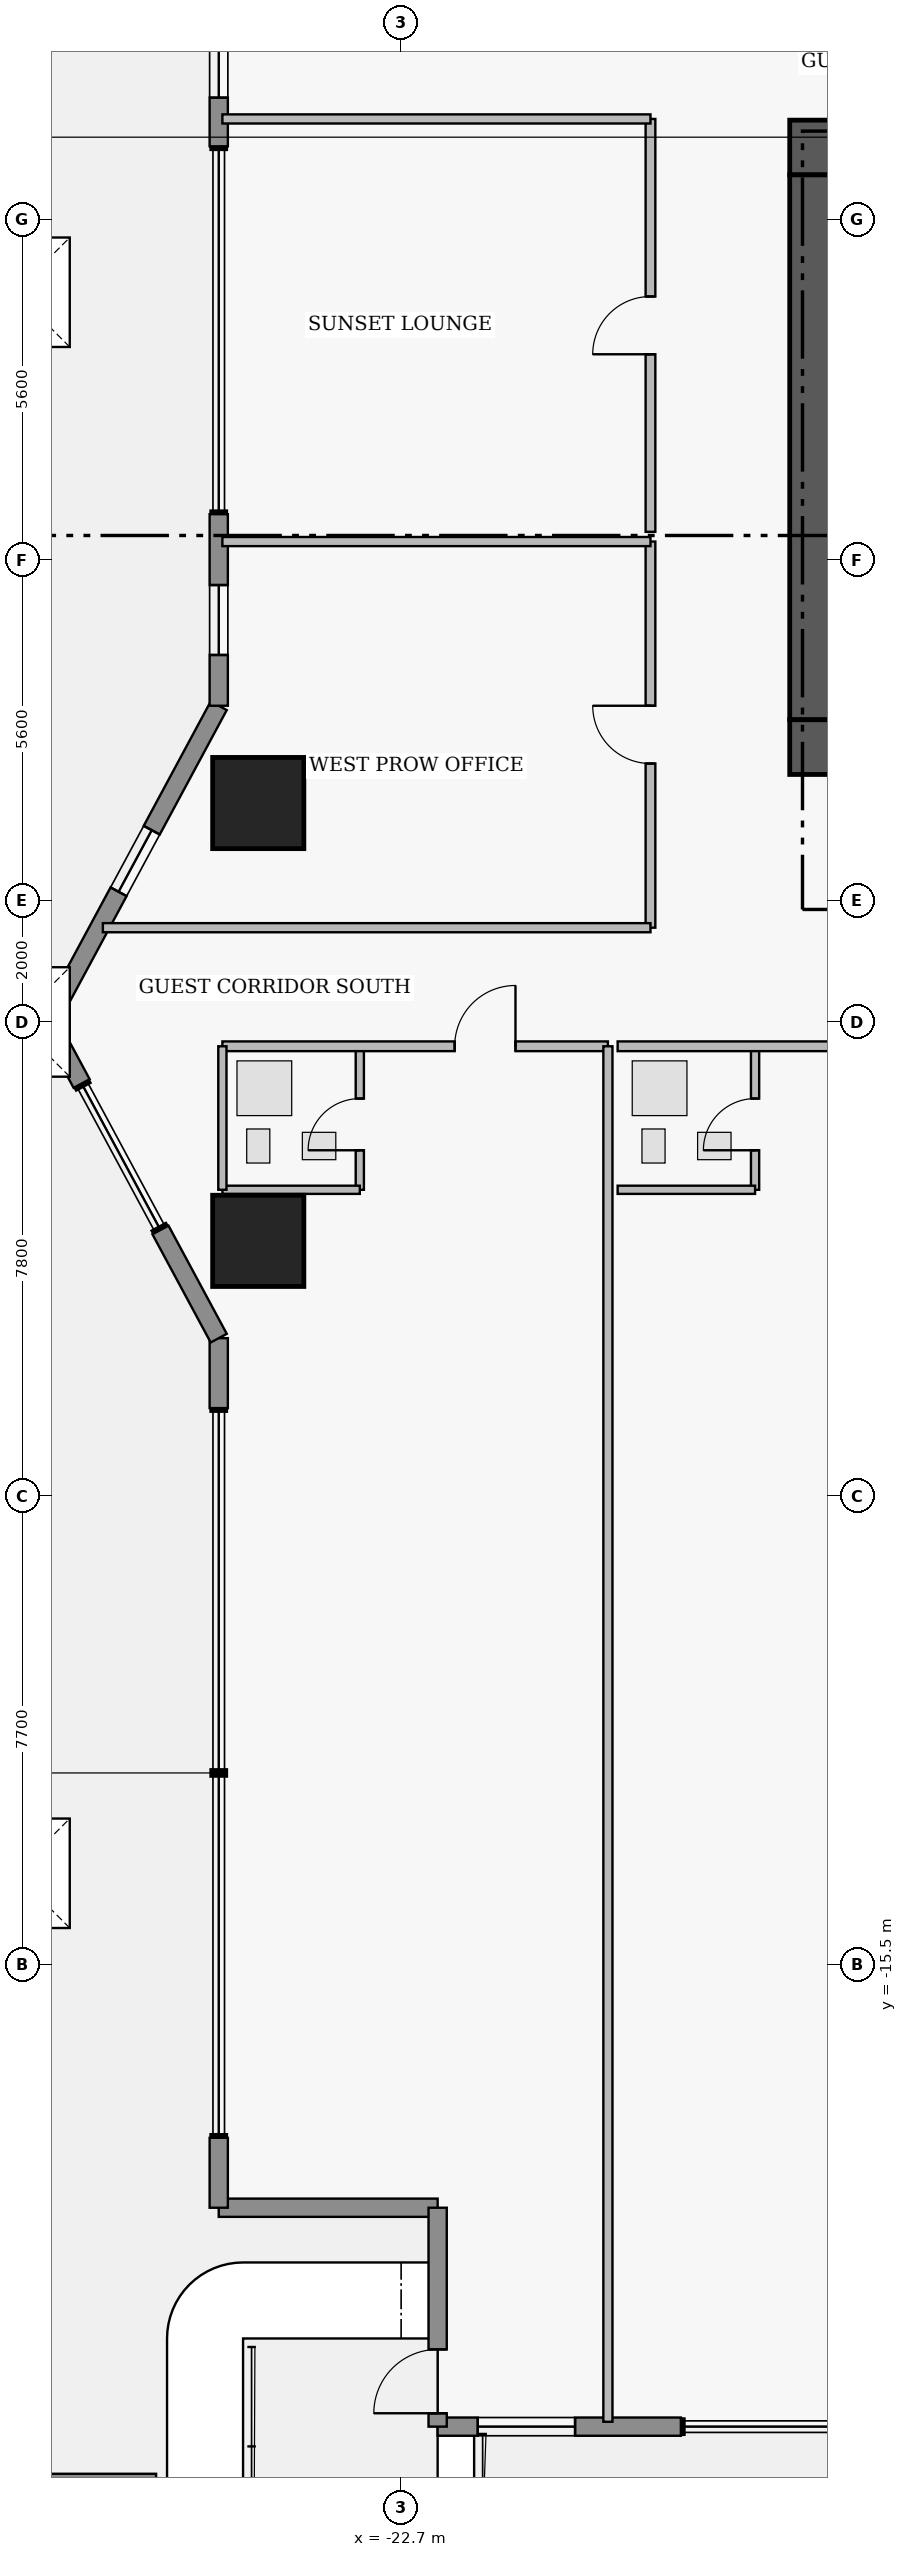
"""IFC4 building model, lengths in metres.
Left out: names, types, materials, properties, quantities, classifications, styles, units other than length and angle.
Written with IfcOpenShell. Run it as: python <this file> out.ifc"""

import sys

from ifc_helpers import new_model, si_unit, direction, frame, frame_2d, origin, origin_2d, place, context, subcontext, project, spatial, rectangle, extrude, element, fill, save


model = new_model("IFC4")
c1 = context("Model", 3, precision=1e-05, world=origin(), true_north=direction((0.0, 1.0)))
c2 = subcontext(c1, "Body", "Model", "MODEL_VIEW")
j1 = project(units=[si_unit("LENGTHUNIT", "METRE"), si_unit("PLANEANGLEUNIT", "RADIAN")], contexts=[c1])
p1 = place(None, origin())
s1 = spatial("IfcSite", under=j1, at=p1, CompositionType="ELEMENT")
p2 = place(p1, origin())
s2 = spatial("IfcBuilding", under=s1, at=p2, CompositionType="ELEMENT")
p3 = place(p2, frame((0.0, 0.0, 27.6)))
s3 = spatial("IfcBuildingStorey", under=s2, at=p3, CompositionType="ELEMENT", Elevation=27.6)
p4 = place(p3, frame((-16.31, 14.38, 0.0), z_axis=(0.0, 0.0, 1.0), x_axis=(1.0, 0.0, 0.0)))
e1 = element("IfcWall", 1, at=p4, inside=s3, PredefinedType="SHEAR", context=c2, shape_type="SweptSolid", body=[
    extrude(rectangle(XDim=4.71, YDim=0.9, at=frame_2d((2.355, 0.0))), origin(), (0.0, 0.0, 1.0), 3.46),
])
p5 = place(p3, frame((-15.86, 4.97, 0.0), z_axis=(0.0, 0.0, 1.0), x_axis=(0.0, 1.0, 0.0)))
e2 = element("IfcWall", 2, at=p5, inside=s3, PredefinedType="SHEAR", context=c2, shape_type="SweptSolid", body=[
    extrude(rectangle(XDim=8.96, YDim=0.9, at=frame_2d((4.48, 0.0))), origin(), (0.0, 0.0, 1.0), 3.46),
])
p6 = place(p3, frame((-16.31, 4.52, 0.0), z_axis=(0.0, 0.0, 1.0), x_axis=(1.0, 0.0, 0.0)))
e3 = element("IfcWall", 3, at=p6, inside=s3, PredefinedType="SHEAR", context=c2, shape_type="SweptSolid", body=[
    extrude(rectangle(XDim=4.71, YDim=0.9, at=frame_2d((2.355, 0.0))), origin(), (0.0, 0.0, 1.0), 3.46),
])
for number, where, z_axis, x_axis in (
    (4, (-25.05, -3.6, 0.0), (0.0, 0.0, 1.0), (1.0, 0.0, 0.0)),
    (5, (-25.05, 3.6, 0.0), (0.0, 0.0, 1.0), (1.0, 0.0, 0.0)),
):
    element("IfcColumn", number, at=place(p3, frame(where, z_axis=z_axis, x_axis=x_axis)), inside=s3, PredefinedType="COLUMN", context=c2, shape_type="SweptSolid", body=[
        extrude(rectangle(XDim=1.5, YDim=1.5, at=origin_2d()), origin(), (0.0, 0.0, 1.0), 3.65),
    ])
p7 = place(p3, frame((-26.73, -24.0, 0.0), z_axis=(0.0, 0.0, 1.0), x_axis=(-1.0, 0.0, 0.0)))
e6 = element("IfcWall", 6, at=p7, inside=s3, PredefinedType="PARAPET", context=c2, shape_type="SweptSolid", body=[
    extrude(rectangle(XDim=5.09, YDim=0.25, at=frame_2d((2.545, 0.0))), origin(), (0.0, 0.0, 1.0), 1.15),
])
p8 = place(p3, frame((-22.1, -19.5, 0.0), z_axis=(0.0, 0.0, 1.0), x_axis=(-1.0, 0.0, 0.0)))
e7 = element("IfcWall", 7, at=p8, inside=s3, PredefinedType="STANDARD", context=c2, shape_type="SweptSolid", body=[
    extrude(rectangle(XDim=3.6, YDim=0.3, at=frame_2d((1.8, 0.0))), origin(), (0.0, 0.0, 1.0), 3.43),
])
p9 = place(p3, frame((-25.7, -19.5, 0.0), z_axis=(0.0, 0.0, 1.0), x_axis=(0.0, 1.0, 0.0)))
e8 = element("IfcWall", 8, at=p9, inside=s3, PredefinedType="STANDARD", context=c2, shape_type="SweptSolid", body=[
    extrude(rectangle(XDim=1.15, YDim=0.3, at=frame_2d((0.575, 0.0))), origin(), (0.0, 0.0, 1.0), 3.43),
])
p10 = place(p3, frame((-25.7, -6.35, 0.0), z_axis=(0.0, 0.0, 1.0), x_axis=(0.0, 1.0, 0.0)))
e9 = element("IfcWall", 9, at=p10, inside=s3, PredefinedType="STANDARD", context=c2, shape_type="SweptSolid", body=[
    extrude(rectangle(XDim=1.15, YDim=0.3, at=frame_2d((0.575, 0.0))), origin(), (0.0, 0.0, 1.0), 3.43),
])
p11 = place(p3, frame((-25.7, -5.2, 0.0), z_axis=(0.0, 0.0, 1.0), x_axis=(-0.474121438562, 0.88045946045, 0.0)))
e10 = element("IfcWall", 10, at=p11, inside=s3, PredefinedType="STANDARD", context=c2, shape_type="SweptSolid", body=[
    extrude(rectangle(XDim=2.021, YDim=0.3, at=frame_2d((1.01, 0.0))), origin(), (0.0, 0.0, 1.0), 3.43),
])
p12 = place(p3, frame((-27.955, -1.012, 0.0), z_axis=(0.0, 0.0, 1.0), x_axis=(-0.474099823035, 0.880471099922, 0.0)))
e11 = element("IfcWall", 11, at=p12, inside=s3, PredefinedType="STANDARD", context=c2, shape_type="SweptSolid", body=[
    extrude(rectangle(XDim=1.15, YDim=0.3, at=frame_2d((0.575, 0.0))), origin(), (0.0, 0.0, 1.0), 3.43),
])
p13 = place(p3, frame((-28.5, 0.0, 0.0), z_axis=(0.0, 0.0, 1.0), x_axis=(0.474109683532, 0.880465790352, 0.0)))
e12 = element("IfcWall", 12, at=p13, inside=s3, PredefinedType="STANDARD", context=c2, shape_type="SweptSolid", body=[
    extrude(rectangle(XDim=5.906, YDim=0.3, at=frame_2d((2.953, 0.0))), origin(), (0.0, 0.0, 1.0), 3.43),
])
p14 = place(p13, frame((2.432, 0.0, 0.95)))
e13 = element("IfcOpeningElement", 13, at=p14, cuts=e12, PredefinedType="OPENING", context=c2, shape_type="SweptSolid", body=[
    extrude(rectangle(XDim=1.15, YDim=1.55, at=frame_2d((0.575, 0.775))), frame((0.0, 0.16, 0.0), z_axis=(0.0, -1.0, 0.0), x_axis=(1.0, 0.0, 0.0)), (0.0, 0.0, 1.0), 0.32),
])
p15 = place(p3, frame((-25.7, 5.2, 0.0), z_axis=(0.0, 0.0, 1.0), x_axis=(0.0, 1.0, 0.0)))
e14 = element("IfcWall", 14, at=p15, inside=s3, PredefinedType="STANDARD", context=c2, shape_type="SweptSolid", body=[
    extrude(rectangle(XDim=3.15, YDim=0.3, at=frame_2d((1.575, 0.0))), origin(), (0.0, 0.0, 1.0), 3.43),
])
p16 = place(p15, frame((0.835, 0.0, 0.95)))
e15 = element("IfcOpeningElement", 15, at=p16, cuts=e14, PredefinedType="OPENING", context=c2, shape_type="SweptSolid", body=[
    extrude(rectangle(XDim=1.15, YDim=1.55, at=frame_2d((0.575, 0.775))), frame((0.0, 0.16, 0.0), z_axis=(0.0, -1.0, 0.0), x_axis=(1.0, 0.0, 0.0)), (0.0, 0.0, 1.0), 0.32),
])
p17 = place(p3, frame((-25.7, 14.4, 0.0), z_axis=(0.0, 0.0, 1.0), x_axis=(0.0, 1.0, 0.0)))
e16 = element("IfcWall", 16, at=p17, inside=s3, PredefinedType="STANDARD", context=c2, shape_type="SweptSolid", body=[
    extrude(rectangle(XDim=5.1, YDim=0.3, at=frame_2d((2.55, 0.0))), origin(), (0.0, 0.0, 1.0), 3.43),
])
p18 = place(p17, frame((0.8, 0.0, 0.95)))
e17 = element("IfcOpeningElement", 17, at=p18, cuts=e16, PredefinedType="OPENING", context=c2, shape_type="SweptSolid", body=[
    extrude(rectangle(XDim=1.15, YDim=1.55, at=frame_2d((0.575, 0.775))), frame((0.0, 0.16, 0.0), z_axis=(0.0, -1.0, 0.0), x_axis=(1.0, 0.0, 0.0)), (0.0, 0.0, 1.0), 0.32),
])
p19 = place(p17, frame((2.84, 0.0, 0.85)))
e18 = element("IfcOpeningElement", 18, at=p19, cuts=e16, PredefinedType="OPENING", context=c2, shape_type="SweptSolid", body=[
    extrude(rectangle(XDim=1.6, YDim=1.8, at=frame_2d((0.8, 0.9))), frame((0.0, 0.16, 0.0), z_axis=(0.0, -1.0, 0.0), x_axis=(1.0, 0.0, 0.0)), (0.0, 0.0, 1.0), 0.32),
])
p20 = place(p3, frame((-18.1, -23.1, 0.0), z_axis=(0.0, 0.0, 1.0), x_axis=(-1.0, 0.0, 0.0)))
e19 = element("IfcWall", 19, at=p20, inside=s3, PredefinedType="STANDARD", context=c2, shape_type="SweptSolid", body=[
    extrude(rectangle(XDim=4.0, YDim=0.3, at=frame_2d((2.0, 0.0))), origin(), (0.0, 0.0, 1.0), 3.43),
])
p21 = place(p20, frame((1.74, 0.0, 0.85)))
e20 = element("IfcOpeningElement", 20, at=p21, cuts=e19, PredefinedType="OPENING", context=c2, shape_type="SweptSolid", body=[
    extrude(rectangle(XDim=1.6, YDim=1.8, at=frame_2d((0.8, 0.9))), frame((0.0, 0.16, 0.0), z_axis=(0.0, -1.0, 0.0), x_axis=(1.0, 0.0, 0.0)), (0.0, 0.0, 1.0), 0.32),
])
p22 = place(p3, frame((-22.1, -23.1, 0.0), z_axis=(0.0, 0.0, 1.0), x_axis=(0.0, 1.0, 0.0)))
e21 = element("IfcWall", 21, at=p22, inside=s3, PredefinedType="STANDARD", context=c2, shape_type="SweptSolid", body=[
    extrude(rectangle(XDim=3.6, YDim=0.3, at=frame_2d((1.8, 0.0))), origin(), (0.0, 0.0, 1.0), 3.43),
])
p23 = place(p22, frame((0.22, 0.0, 0.0)))
e22 = element("IfcOpeningElement", 22, at=p23, cuts=e21, PredefinedType="OPENING", context=c2, shape_type="SweptSolid", body=[
    extrude(rectangle(XDim=1.05, YDim=2.2, at=frame_2d((0.525, 1.1))), frame((0.0, 0.16, 0.0), z_axis=(0.0, -1.0, 0.0), x_axis=(1.0, 0.0, 0.0)), (0.0, 0.0, 1.0), 0.32),
])
p24 = place(p3, frame((-23.38, -2.76, 0.0), z_axis=(0.0, 0.0, 1.0), x_axis=(0.0, 1.0, 0.0)))
e23 = element("IfcWall", 23, at=p24, inside=s3, PredefinedType="PLUMBINGWALL", context=c2, shape_type="SweptSolid", body=[
    extrude(rectangle(XDim=2.36, YDim=0.135, at=frame_2d((1.18, 0.0))), origin(), (0.0, 0.0, 1.0), 3.43),
])
p25 = place(p24, frame((0.65, 0.0, 0.0)))
e24 = element("IfcOpeningElement", 24, at=p25, cuts=e23, PredefinedType="OPENING", context=c2, shape_type="SweptSolid", body=[
    extrude(rectangle(XDim=0.85, YDim=2.1, at=frame_2d((0.425, 1.05))), frame((0.0, 0.077, 0.0), z_axis=(0.0, -1.0, 0.0), x_axis=(1.0, 0.0, 0.0)), (0.0, 0.0, 1.0), 0.155),
])
p26 = place(p3, frame((-25.64, -0.4, 0.0), z_axis=(0.0, 0.0, 1.0), x_axis=(1.0, 0.0, 0.0)))
e25 = element("IfcWall", 25, at=p26, inside=s3, PredefinedType="PARTITIONING", context=c2, shape_type="SweptSolid", body=[
    extrude(rectangle(XDim=6.34, YDim=0.16, at=frame_2d((3.17, 0.0))), origin(), (0.0, 0.0, 1.0), 3.43),
])
p27 = place(p26, frame((3.82, 0.0, 0.0)))
e26 = element("IfcOpeningElement", 26, at=p27, cuts=e25, PredefinedType="OPENING", context=c2, shape_type="SweptSolid", body=[
    extrude(rectangle(XDim=1.0, YDim=2.15, at=frame_2d((0.5, 1.075))), frame((0.0, 0.09, 0.0), z_axis=(0.0, -1.0, 0.0), x_axis=(1.0, 0.0, 0.0)), (0.0, 0.0, 1.0), 0.18),
])
p28 = place(p3, frame((-16.88, -2.76, 0.0), z_axis=(0.0, 0.0, 1.0), x_axis=(0.0, 1.0, 0.0)))
e27 = element("IfcWall", 27, at=p28, inside=s3, PredefinedType="PLUMBINGWALL", context=c2, shape_type="SweptSolid", body=[
    extrude(rectangle(XDim=2.36, YDim=0.135, at=frame_2d((1.18, 0.0))), origin(), (0.0, 0.0, 1.0), 3.43),
])
p29 = place(p28, frame((0.65, 0.0, 0.0)))
e28 = element("IfcOpeningElement", 28, at=p29, cuts=e27, PredefinedType="OPENING", context=c2, shape_type="SweptSolid", body=[
    extrude(rectangle(XDim=0.85, YDim=2.1, at=frame_2d((0.425, 1.05))), frame((0.0, 0.077, 0.0), z_axis=(0.0, -1.0, 0.0), x_axis=(1.0, 0.0, 0.0)), (0.0, 0.0, 1.0), 0.155),
])
p30 = place(p3, frame((-19.14, -0.4, 0.0), z_axis=(0.0, 0.0, 1.0), x_axis=(1.0, 0.0, 0.0)))
e29 = element("IfcWall", 29, at=p30, inside=s3, PredefinedType="PARTITIONING", context=c2, shape_type="SweptSolid", body=[
    extrude(rectangle(XDim=6.34, YDim=0.16, at=frame_2d((3.17, 0.0))), origin(), (0.0, 0.0, 1.0), 3.43),
])
p31 = place(p30, frame((3.82, 0.0, 0.0)))
e30 = element("IfcOpeningElement", 30, at=p31, cuts=e29, PredefinedType="OPENING", context=c2, shape_type="SweptSolid", body=[
    extrude(rectangle(XDim=1.0, YDim=2.15, at=frame_2d((0.5, 1.075))), frame((0.0, 0.09, 0.0), z_axis=(0.0, -1.0, 0.0), x_axis=(1.0, 0.0, 0.0)), (0.0, 0.0, 1.0), 0.18),
])
p32 = place(p3, frame((-18.6, 1.55, 0.0), z_axis=(0.0, 0.0, 1.0), x_axis=(0.0, 1.0, 0.0)))
e31 = element("IfcWall", 31, at=p32, inside=s3, PredefinedType="PARTITIONING", context=c2, shape_type="SweptSolid", body=[
    extrude(rectangle(XDim=6.35, YDim=0.16, at=frame_2d((3.175, 0.0))), origin(), (0.0, 0.0, 1.0), 3.43),
])
p33 = place(p32, frame((2.7, 0.0, 0.0)))
e32 = element("IfcOpeningElement", 32, at=p33, cuts=e31, PredefinedType="OPENING", context=c2, shape_type="SweptSolid", body=[
    extrude(rectangle(XDim=0.95, YDim=2.15, at=frame_2d((0.475, 1.075))), frame((0.0, 0.09, 0.0), z_axis=(0.0, -1.0, 0.0), x_axis=(1.0, 0.0, 0.0)), (0.0, 0.0, 1.0), 0.18),
])
p34 = place(p3, frame((-18.6, 8.06, 0.0), z_axis=(0.0, 0.0, 1.0), x_axis=(0.0, 1.0, 0.0)))
e33 = element("IfcWall", 33, at=p34, inside=s3, PredefinedType="PARTITIONING", context=c2, shape_type="SweptSolid", body=[
    extrude(rectangle(XDim=6.79, YDim=0.16, at=frame_2d((3.395, 0.0))), origin(), (0.0, 0.0, 1.0), 3.43),
])
p35 = place(p34, frame((2.92, 0.0, 0.0)))
e34 = element("IfcOpeningElement", 34, at=p35, cuts=e33, PredefinedType="OPENING", context=c2, shape_type="SweptSolid", body=[
    extrude(rectangle(XDim=0.95, YDim=2.15, at=frame_2d((0.475, 1.075))), frame((0.0, 0.09, 0.0), z_axis=(0.0, -1.0, 0.0), x_axis=(1.0, 0.0, 0.0)), (0.0, 0.0, 1.0), 0.18),
])
p36 = place(p3, frame((-25.64, -2.76, 0.0), z_axis=(0.0, 0.0, 1.0), x_axis=(1.0, 0.0, 0.0)))
e35 = element("IfcWall", 35, at=p36, inside=s3, PredefinedType="PLUMBINGWALL", context=c2, shape_type="SweptSolid", body=[
    extrude(rectangle(XDim=2.26, YDim=0.135, at=frame_2d((1.13, 0.0))), origin(), (0.0, 0.0, 1.0), 3.43),
])
p37 = place(p3, frame((-25.64, -2.76, 0.0), z_axis=(0.0, 0.0, 1.0), x_axis=(0.0, 1.0, 0.0)))
e36 = element("IfcWall", 36, at=p37, inside=s3, PredefinedType="PLUMBINGWALL", context=c2, shape_type="SweptSolid", body=[
    extrude(rectangle(XDim=2.36, YDim=0.135, at=frame_2d((1.18, 0.0))), origin(), (0.0, 0.0, 1.0), 3.43),
])
p38 = place(p3, frame((-19.3, -23.02, 0.0), z_axis=(0.0, 0.0, 1.0), x_axis=(0.0, 1.0, 0.0)))
e37 = element("IfcWall", 37, at=p38, inside=s3, PredefinedType="PARTITIONING", context=c2, shape_type="SweptSolid", body=[
    extrude(rectangle(XDim=22.62, YDim=0.15, at=frame_2d((11.31, 0.0))), origin(), (0.0, 0.0, 1.0), 3.43),
])
p39 = place(p3, frame((-19.14, -2.76, 0.0), z_axis=(0.0, 0.0, 1.0), x_axis=(1.0, 0.0, 0.0)))
e38 = element("IfcWall", 38, at=p39, inside=s3, PredefinedType="PLUMBINGWALL", context=c2, shape_type="SweptSolid", body=[
    extrude(rectangle(XDim=2.26, YDim=0.135, at=frame_2d((1.13, 0.0))), origin(), (0.0, 0.0, 1.0), 3.43),
])
p40 = place(p3, frame((-27.605, 1.55, 0.0), z_axis=(0.0, 0.0, 1.0), x_axis=(1.0, 0.0, 0.0)))
e39 = element("IfcWall", 39, at=p40, inside=s3, PredefinedType="PARTITIONING", context=c2, shape_type="SweptSolid", body=[
    extrude(rectangle(XDim=9.005, YDim=0.15, at=frame_2d((4.503, 0.0))), origin(), (0.0, 0.0, 1.0), 3.43),
])
for number, where, z_axis, x_axis in (
    (40, (-25.64, 7.9, 0.0), (0.0, 0.0, 1.0), (1.0, 0.0, 0.0)),
    (41, (-25.64, 14.85, 0.0), (0.0, 0.0, 1.0), (1.0, 0.0, 0.0)),
):
    element("IfcWall", number, at=place(p3, frame(where, z_axis=z_axis, x_axis=x_axis)), inside=s3, PredefinedType="PARTITIONING", context=c2, shape_type="SweptSolid", body=[
        extrude(rectangle(XDim=7.04, YDim=0.15, at=frame_2d((3.52, 0.0))), origin(), (0.0, 0.0, 1.0), 3.43),
    ])
p41 = place(p3, frame((0.0, 0.0, -0.22)))
p42 = place(p41, frame((-29.05, -14.0, 0.0)))
p43 = place(p42, frame((0.0, 0.0, 0.17)))
e42 = element("IfcWindow", 42, at=p43, inside=s3, PartitioningType="SINGLE_PANEL", PredefinedType="SKYLIGHT", context=c2, shape_type="SweptSolid", body=[
    extrude(rectangle(XDim=1.8, YDim=1.8, at=origin_2d()), origin(), (0.0, 0.0, 1.0), 0.05),
])
p44 = place(p41, frame((-29.05, 0.0, 0.0)))
p45 = place(p44, frame((0.0, 0.0, 0.17)))
e43 = element("IfcWindow", 43, at=p45, inside=s3, PartitioningType="SINGLE_PANEL", PredefinedType="SKYLIGHT", context=c2, shape_type="SweptSolid", body=[
    extrude(rectangle(XDim=1.8, YDim=1.8, at=origin_2d()), origin(), (0.0, 0.0, 1.0), 0.05),
])
p46 = place(p41, frame((-29.05, 12.0, 0.0)))
p47 = place(p46, frame((0.0, 0.0, 0.17)))
e44 = element("IfcWindow", 44, at=p47, inside=s3, PartitioningType="SINGLE_PANEL", PredefinedType="SKYLIGHT", context=c2, shape_type="SweptSolid", body=[
    extrude(rectangle(XDim=1.8, YDim=1.8, at=origin_2d()), origin(), (0.0, 0.0, 1.0), 0.05),
])
p48 = place(p14, origin())
e45 = element("IfcWindow", 45, at=p48, inside=s3, PartitioningType="SINGLE_PANEL", PredefinedType="WINDOW", context=c2, shape_type="SweptSolid", body=[
    extrude(rectangle(XDim=1.15, YDim=1.55, at=frame_2d((0.575, 0.775))), frame((0.0, 0.03, 0.0), z_axis=(0.0, -1.0, 0.0), x_axis=(1.0, 0.0, 0.0)), (0.0, 0.0, 1.0), 0.06),
])
fill(e13, e45)
p49 = place(p16, origin())
e46 = element("IfcWindow", 46, at=p49, inside=s3, PartitioningType="SINGLE_PANEL", PredefinedType="WINDOW", context=c2, shape_type="SweptSolid", body=[
    extrude(rectangle(XDim=1.15, YDim=1.55, at=frame_2d((0.575, 0.775))), frame((0.0, 0.03, 0.0), z_axis=(0.0, -1.0, 0.0), x_axis=(1.0, 0.0, 0.0)), (0.0, 0.0, 1.0), 0.06),
])
fill(e15, e46)
p50 = place(p18, origin())
e47 = element("IfcWindow", 47, at=p50, inside=s3, PartitioningType="SINGLE_PANEL", PredefinedType="WINDOW", context=c2, shape_type="SweptSolid", body=[
    extrude(rectangle(XDim=1.15, YDim=1.55, at=frame_2d((0.575, 0.775))), frame((0.0, 0.03, 0.0), z_axis=(0.0, -1.0, 0.0), x_axis=(1.0, 0.0, 0.0)), (0.0, 0.0, 1.0), 0.06),
])
fill(e17, e47)
p51 = place(p21, origin())
e48 = element("IfcWindow", 48, at=p51, inside=s3, PartitioningType="SINGLE_PANEL", PredefinedType="WINDOW", context=c2, shape_type="SweptSolid", body=[
    extrude(rectangle(XDim=1.6, YDim=1.8, at=frame_2d((0.8, 0.9))), frame((0.0, 0.03, 0.0), z_axis=(0.0, -1.0, 0.0), x_axis=(1.0, 0.0, 0.0)), (0.0, 0.0, 1.0), 0.06),
])
fill(e20, e48)
p52 = place(p23, origin())
e49 = element("IfcDoor", 49, at=p52, inside=s3, OperationType="SINGLE_SWING_LEFT", PredefinedType="DOOR", context=c2, shape_type="SweptSolid", body=[
    extrude(rectangle(XDim=1.05, YDim=2.2, at=frame_2d((0.525, 1.1))), frame((0.0, 0.025, 0.0), z_axis=(0.0, -1.0, 0.0), x_axis=(1.0, 0.0, 0.0)), (0.0, 0.0, 1.0), 0.05),
])
fill(e22, e49)
p53 = place(p25, origin())
e50 = element("IfcDoor", 50, at=p53, inside=s3, OperationType="SINGLE_SWING_LEFT", PredefinedType="DOOR", context=c2, shape_type="SweptSolid", body=[
    extrude(rectangle(XDim=0.85, YDim=2.1, at=frame_2d((0.425, 1.05))), frame((0.0, 0.025, 0.0), z_axis=(0.0, -1.0, 0.0), x_axis=(1.0, 0.0, 0.0)), (0.0, 0.0, 1.0), 0.05),
])
fill(e24, e50)
p54 = place(p27, origin())
e51 = element("IfcDoor", 51, at=p54, inside=s3, OperationType="SINGLE_SWING_RIGHT", PredefinedType="DOOR", context=c2, shape_type="SweptSolid", body=[
    extrude(rectangle(XDim=1.0, YDim=2.15, at=frame_2d((0.5, 1.075))), frame((0.0, 0.025, 0.0), z_axis=(0.0, -1.0, 0.0), x_axis=(1.0, 0.0, 0.0)), (0.0, 0.0, 1.0), 0.05),
])
fill(e26, e51)
p55 = place(p29, origin())
e52 = element("IfcDoor", 52, at=p55, inside=s3, OperationType="SINGLE_SWING_LEFT", PredefinedType="DOOR", context=c2, shape_type="SweptSolid", body=[
    extrude(rectangle(XDim=0.85, YDim=2.1, at=frame_2d((0.425, 1.05))), frame((0.0, 0.025, 0.0), z_axis=(0.0, -1.0, 0.0), x_axis=(1.0, 0.0, 0.0)), (0.0, 0.0, 1.0), 0.05),
])
fill(e28, e52)
p56 = place(p33, origin())
e53 = element("IfcDoor", 53, at=p56, inside=s3, OperationType="SINGLE_SWING_RIGHT", PredefinedType="DOOR", context=c2, shape_type="SweptSolid", body=[
    extrude(rectangle(XDim=0.95, YDim=2.15, at=frame_2d((0.475, 1.075))), frame((0.0, 0.025, 0.0), z_axis=(0.0, -1.0, 0.0), x_axis=(1.0, 0.0, 0.0)), (0.0, 0.0, 1.0), 0.05),
])
fill(e32, e53)
p57 = place(p35, origin())
e54 = element("IfcDoor", 54, at=p57, inside=s3, OperationType="SINGLE_SWING_LEFT", PredefinedType="DOOR", context=c2, shape_type="SweptSolid", body=[
    extrude(rectangle(XDim=0.95, YDim=2.15, at=frame_2d((0.475, 1.075))), frame((0.0, 0.025, 0.0), z_axis=(0.0, -1.0, 0.0), x_axis=(1.0, 0.0, 0.0)), (0.0, 0.0, 1.0), 0.05),
])
fill(e34, e54)
save(model, sys.argv[1])
